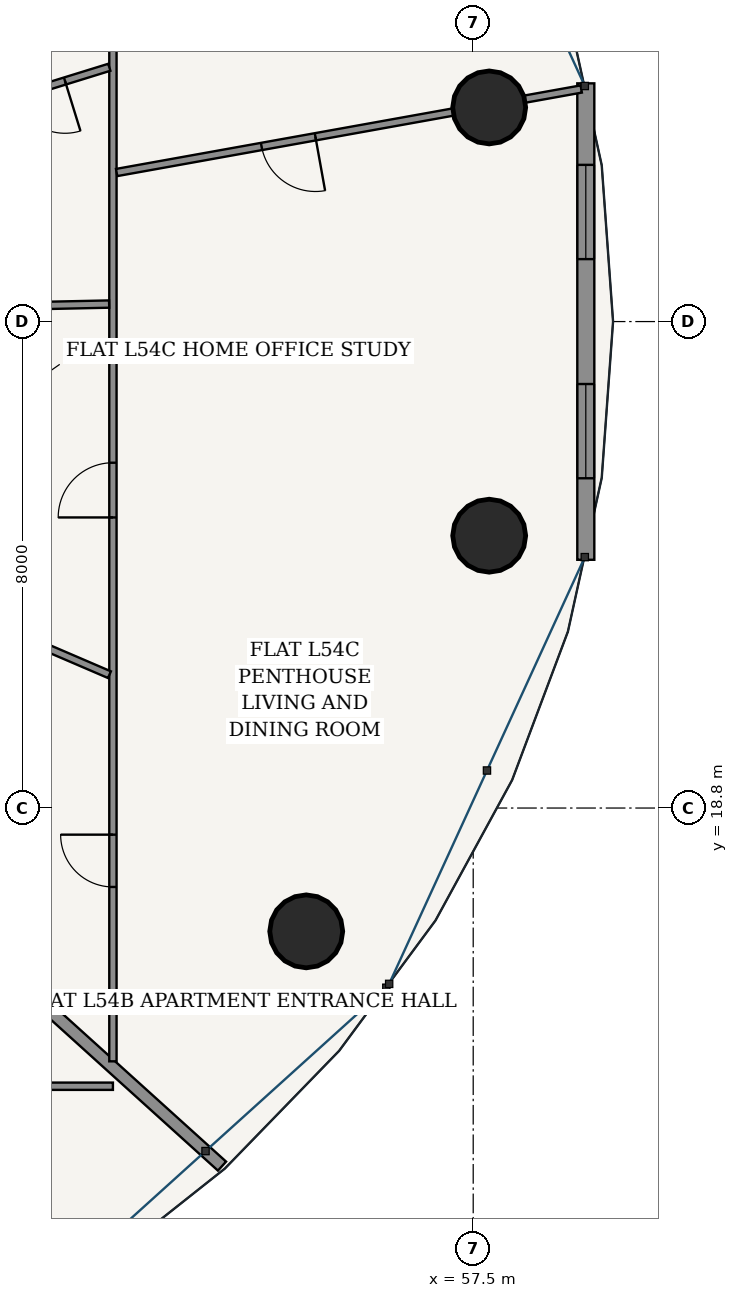
"""IFC4 building model, lengths in metres.
Left out: names, types, materials, properties, quantities, classifications, styles, units other than length and angle.
Written with IfcOpenShell. Run it as: python <this file> out.ifc"""

import sys

from ifc_helpers import new_model, si_unit, direction, frame, frame_2d, origin, origin_2d, place, context, subcontext, project, spatial, rectangle, hollow_circle, extrude, source, transform, mapped, element, fill, save


model = new_model("IFC4")
c1 = context("Model", 3, precision=1e-05, world=origin(), true_north=direction((-0.2419218956, 0.970295726276)))
c2 = subcontext(c1, "Body", "Model", "MODEL_VIEW")
j1 = project(units=[si_unit("LENGTHUNIT", "METRE"), si_unit("PLANEANGLEUNIT", "RADIAN")], contexts=[c1])
p1 = place(None, origin())
s1 = spatial("IfcSite", under=j1, at=p1, CompositionType="ELEMENT")
p2 = place(p1, origin())
s2 = spatial("IfcBuilding", under=s1, at=p2, CompositionType="ELEMENT")
p3 = place(p2, frame((0.0, 0.0, 206.0)))
s3 = spatial("IfcBuildingStorey", under=s2, at=p3, CompositionType="ELEMENT", Elevation=206.0)
for number, where, z_axis, x_axis in (
    (1, (57.763, 30.321, 0.0), (0.0, 0.0, 1.0), (1.0, 0.0, 0.0)),
    (2, (54.754, 16.772, 0.0), (0.0, 0.0, 1.0), (1.0, 0.0, 0.0)),
    (3, (57.763, 23.279, 0.0), (0.0, 0.0, 1.0), (1.0, 0.0, 0.0)),
):
    element("IfcColumn", number, at=place(p3, frame(where, z_axis=z_axis, x_axis=x_axis)), inside=s3, PredefinedType="COLUMN", context=c2, shape_type="SweptSolid", body=[
        extrude(hollow_circle(Radius=0.6, WallThickness=0.038, at=origin_2d()), origin(), (0.0, 0.0, 1.0), 3.7),
    ])
p4 = place(p3, frame((59.352, 22.883, 0.0), z_axis=(0.0, 0.0, 1.0), x_axis=(0.0, 1.0, 0.0)))
e4 = element("IfcWall", 4, at=p4, inside=s3, PredefinedType="SOLIDWALL", context=c2, shape_type="SweptSolid", body=[
    extrude(rectangle(XDim=7.835, YDim=0.28, at=frame_2d((3.917, 0.0))), origin(), (0.0, 0.0, 1.0), 3.435),
])
p5 = place(p4, frame((1.34, 0.0, 0.85)))
e5 = element("IfcOpeningElement", 5, at=p5, cuts=e4, PredefinedType="OPENING", context=c2, shape_type="SweptSolid", body=[
    extrude(rectangle(XDim=1.55, YDim=1.95, at=frame_2d((0.775, 0.975))), frame((0.0, 0.15, 0.0), z_axis=(0.0, -1.0, 0.0), x_axis=(1.0, 0.0, 0.0)), (0.0, 0.0, 1.0), 0.3),
])
p6 = place(p4, frame((4.944, 0.0, 0.85)))
e6 = element("IfcOpeningElement", 6, at=p6, cuts=e4, PredefinedType="OPENING", context=c2, shape_type="SweptSolid", body=[
    extrude(rectangle(XDim=1.55, YDim=1.95, at=frame_2d((0.775, 0.975))), frame((0.0, 0.15, 0.0), z_axis=(0.0, -1.0, 0.0), x_axis=(1.0, 0.0, 0.0)), (0.0, 0.0, 1.0), 0.3),
])
p7 = place(p3, frame((51.575, 14.225, 0.0), z_axis=(0.0, 0.0, 1.0), x_axis=(-1.0, 0.0, 0.0)))
e7 = element("IfcWall", 7, at=p7, inside=s3, PredefinedType="PARTITIONING", context=c2, shape_type="SweptSolid", body=[
    extrude(rectangle(XDim=19.675, YDim=0.12, at=frame_2d((9.837, 0.0))), origin(), (0.0, 0.0, 1.0), 2.951),
])
p8 = place(p7, frame((3.083, 0.0, 0.0)))
e8 = element("IfcOpeningElement", 8, at=p8, cuts=e7, PredefinedType="OPENING", context=c2, shape_type="SweptSolid", body=[
    extrude(rectangle(XDim=0.9, YDim=2.15, at=frame_2d((0.45, 1.075))), frame((0.0, 0.07, 0.0), z_axis=(0.0, -1.0, 0.0), x_axis=(1.0, 0.0, 0.0)), (0.0, 0.0, 1.0), 0.14),
])
p9 = place(p7, frame((12.063, 0.0, 0.0)))
e9 = element("IfcOpeningElement", 9, at=p9, cuts=e7, PredefinedType="OPENING", context=c2, shape_type="SweptSolid", body=[
    extrude(rectangle(XDim=0.9, YDim=2.15, at=frame_2d((0.45, 1.075))), frame((0.0, 0.07, 0.0), z_axis=(0.0, -1.0, 0.0), x_axis=(1.0, 0.0, 0.0)), (0.0, 0.0, 1.0), 0.14),
])
p10 = place(p7, frame((17.777, 0.0, 0.0)))
e10 = element("IfcOpeningElement", 10, at=p10, cuts=e7, PredefinedType="OPENING", context=c2, shape_type="SweptSolid", body=[
    extrude(rectangle(XDim=0.9, YDim=2.15, at=frame_2d((0.45, 1.075))), frame((0.0, 0.07, 0.0), z_axis=(0.0, -1.0, 0.0), x_axis=(1.0, 0.0, 0.0)), (0.0, 0.0, 1.0), 0.14),
])
p11 = place(p3, frame((49.235, 16.647, 0.0), z_axis=(0.0, 0.0, 1.0), x_axis=(0.741935290449, -0.670471494387, 0.0)))
e11 = element("IfcWall", 11, at=p11, inside=s3, PredefinedType="PARTITIONING", context=c2, shape_type="SweptSolid", body=[
    extrude(rectangle(XDim=5.572, YDim=0.2, at=frame_2d((2.786, 0.0))), origin(), (0.0, 0.0, 1.0), 2.951),
])
p12 = place(p3, frame((51.575, 37.525, 0.0), z_axis=(0.0, 0.0, 1.0), x_axis=(0.0, -1.0, 0.0)))
e12 = element("IfcWall", 12, at=p12, inside=s3, PredefinedType="PARTITIONING", context=c2, shape_type="SweptSolid", body=[
    extrude(rectangle(XDim=22.89, YDim=0.12, at=frame_2d((11.445, 0.0))), origin(), (0.0, 0.0, 1.0), 2.951),
])
p13 = place(p12, frame((4.102, 0.0, 0.0)))
e13 = element("IfcOpeningElement", 13, at=p13, cuts=e12, PredefinedType="OPENING", context=c2, shape_type="SweptSolid", body=[
    extrude(rectangle(XDim=0.9, YDim=2.15, at=frame_2d((0.45, 1.075))), frame((0.0, 0.07, 0.0), z_axis=(0.0, -1.0, 0.0), x_axis=(1.0, 0.0, 0.0)), (0.0, 0.0, 1.0), 0.14),
])
p14 = place(p12, frame((19.163, 0.0, 0.0)))
e14 = element("IfcOpeningElement", 14, at=p14, cuts=e12, PredefinedType="OPENING", context=c2, shape_type="SweptSolid", body=[
    extrude(rectangle(XDim=0.86, YDim=2.15, at=frame_2d((0.43, 1.075))), frame((0.0, 0.07, 0.0), z_axis=(0.0, -1.0, 0.0), x_axis=(1.0, 0.0, 0.0)), (0.0, 0.0, 1.0), 0.14),
])
p15 = place(p12, frame((13.046, 0.0, 0.0)))
e15 = element("IfcOpeningElement", 15, at=p15, cuts=e12, PredefinedType="OPENING", context=c2, shape_type="SweptSolid", body=[
    extrude(rectangle(XDim=0.9, YDim=2.15, at=frame_2d((0.45, 1.075))), frame((0.0, 0.07, 0.0), z_axis=(0.0, -1.0, 0.0), x_axis=(1.0, 0.0, 0.0)), (0.0, 0.0, 1.0), 0.14),
])
p16 = place(p3, frame((51.636, 29.251, 0.0), z_axis=(0.0, 0.0, 1.0), x_axis=(0.984223216243, 0.176931231294, 0.0)))
e16 = element("IfcWall", 16, at=p16, inside=s3, PredefinedType="PARTITIONING", context=c2, shape_type="SweptSolid", body=[
    extrude(rectangle(XDim=7.763, YDim=0.12, at=frame_2d((3.882, 0.0))), origin(), (0.0, 0.0, 1.0), 2.951),
])
p17 = place(p16, frame((2.421, 0.0, 0.0)))
e17 = element("IfcOpeningElement", 17, at=p17, cuts=e16, PredefinedType="OPENING", context=c2, shape_type="SweptSolid", body=[
    extrude(rectangle(XDim=0.9, YDim=2.15, at=frame_2d((0.45, 1.075))), frame((0.0, 0.07, 0.0), z_axis=(0.0, -1.0, 0.0), x_axis=(1.0, 0.0, 0.0)), (0.0, 0.0, 1.0), 0.14),
])
p18 = place(p3, frame((49.237, 21.973, 0.0), z_axis=(0.0, 0.0, 1.0), x_axis=(0.91880901308, -0.394702416364, 0.0)))
e18 = element("IfcWall", 18, at=p18, inside=s3, PredefinedType="PARTITIONING", context=c2, shape_type="SweptSolid", body=[
    extrude(rectangle(XDim=2.483, YDim=0.12, at=frame_2d((1.241, 0.0))), origin(), (0.0, 0.0, 1.0), 3.11),
])
p19 = place(p3, frame((49.237, 27.039, 0.0), z_axis=(0.0, 0.0, 1.0), x_axis=(0.999772223164, 0.021342487922, 0.0)))
e19 = element("IfcWall", 19, at=p19, inside=s3, PredefinedType="PARTITIONING", context=c2, shape_type="SweptSolid", body=[
    extrude(rectangle(XDim=2.276, YDim=0.12, at=frame_2d((1.138, 0.0))), origin(), (0.0, 0.0, 1.0), 3.435),
])
p20 = place(p3, frame((49.237, 30.277, 0.0), z_axis=(0.0, 0.0, 1.0), x_axis=(0.955326488692, 0.295552533406, 0.0)))
e20 = element("IfcWall", 20, at=p20, inside=s3, PredefinedType="PARTITIONING", context=c2, shape_type="SweptSolid", body=[
    extrude(rectangle(XDim=2.386, YDim=0.12, at=frame_2d((1.193, 0.0))), origin(), (0.0, 0.0, 1.0), 3.435),
])
p21 = place(p20, frame((0.763, 0.0, 0.0)))
e21 = element("IfcOpeningElement", 21, at=p21, cuts=e20, PredefinedType="OPENING", context=c2, shape_type="SweptSolid", body=[
    extrude(rectangle(XDim=0.86, YDim=2.15, at=frame_2d((0.43, 1.075))), frame((0.0, 0.07, 0.0), z_axis=(0.0, -1.0, 0.0), x_axis=(1.0, 0.0, 0.0)), (0.0, 0.0, 1.0), 0.14),
])
m1 = source(origin(), c2, "Body", "SweptSolid", [
    extrude(rectangle(XDim=1.55, YDim=1.95, at=frame_2d((0.775, 0.975))), frame((0.0, 0.03, 0.0), z_axis=(0.0, -1.0, 0.0), x_axis=(1.0, 0.0, 0.0)), (0.0, 0.0, 1.0), 0.06),
])
p22 = place(p5, origin())
e22 = element("IfcWindow", 22, at=p22, inside=s3, PartitioningType="SINGLE_PANEL", PredefinedType="WINDOW", context=c2, shape_type="MappedRepresentation", body=[
    mapped(m1, transform((0.0, 0.0, 0.0), scale=1.0)),
])
fill(e5, e22)
p23 = place(p6, origin())
e23 = element("IfcWindow", 23, at=p23, inside=s3, PartitioningType="SINGLE_PANEL", PredefinedType="WINDOW", context=c2, shape_type="MappedRepresentation", body=[
    mapped(m1, transform((0.0, 0.0, 0.0), scale=1.0)),
])
fill(e6, e23)
m2 = source(origin(), c2, "Body", "SweptSolid", [
    extrude(rectangle(XDim=0.86, YDim=2.15, at=frame_2d((0.43, 1.075))), frame((0.0, 0.025, 0.0), z_axis=(0.0, -1.0, 0.0), x_axis=(1.0, 0.0, 0.0)), (0.0, 0.0, 1.0), 0.05),
])
p24 = place(p21, frame((0.86, 0.0, 0.0), z_axis=(0.0, 0.0, 1.0), x_axis=(-1.0, 0.0, 0.0)))
e24 = element("IfcDoor", 24, at=p24, inside=s3, OperationType="SINGLE_SWING_LEFT", PredefinedType="DOOR", context=c2, shape_type="MappedRepresentation", body=[
    mapped(m2, transform((0.0, 0.0, 0.0), scale=1.0)),
])
fill(e21, e24)
m3 = source(origin(), c2, "Body", "SweptSolid", [
    extrude(rectangle(XDim=0.9, YDim=2.15, at=frame_2d((0.45, 1.075))), frame((0.0, 0.025, 0.0), z_axis=(0.0, -1.0, 0.0), x_axis=(1.0, 0.0, 0.0)), (0.0, 0.0, 1.0), 0.05),
])
p25 = place(p17, frame((0.9, 0.0, 0.0), z_axis=(0.0, 0.0, 1.0), x_axis=(-1.0, 0.0, 0.0)))
e25 = element("IfcDoor", 25, at=p25, inside=s3, OperationType="SINGLE_SWING_LEFT", PredefinedType="DOOR", context=c2, shape_type="MappedRepresentation", body=[
    mapped(m3, transform((0.0, 0.0, 0.0), scale=1.0)),
])
fill(e17, e25)
p26 = place(p14, frame((0.86, 0.0, 0.0), z_axis=(0.0, 0.0, 1.0), x_axis=(-1.0, 0.0, 0.0)))
e26 = element("IfcDoor", 26, at=p26, inside=s3, OperationType="SINGLE_SWING_RIGHT", PredefinedType="DOOR", context=c2, shape_type="MappedRepresentation", body=[
    mapped(m2, transform((0.0, 0.0, 0.0), scale=1.0)),
])
fill(e14, e26)
p27 = place(p15, frame((0.9, 0.0, 0.0), z_axis=(0.0, 0.0, 1.0), x_axis=(-1.0, 0.0, 0.0)))
e27 = element("IfcDoor", 27, at=p27, inside=s3, OperationType="SINGLE_SWING_LEFT", PredefinedType="DOOR", context=c2, shape_type="MappedRepresentation", body=[
    mapped(m3, transform((0.0, 0.0, 0.0), scale=1.0)),
])
fill(e15, e27)
save(model, sys.argv[1])
